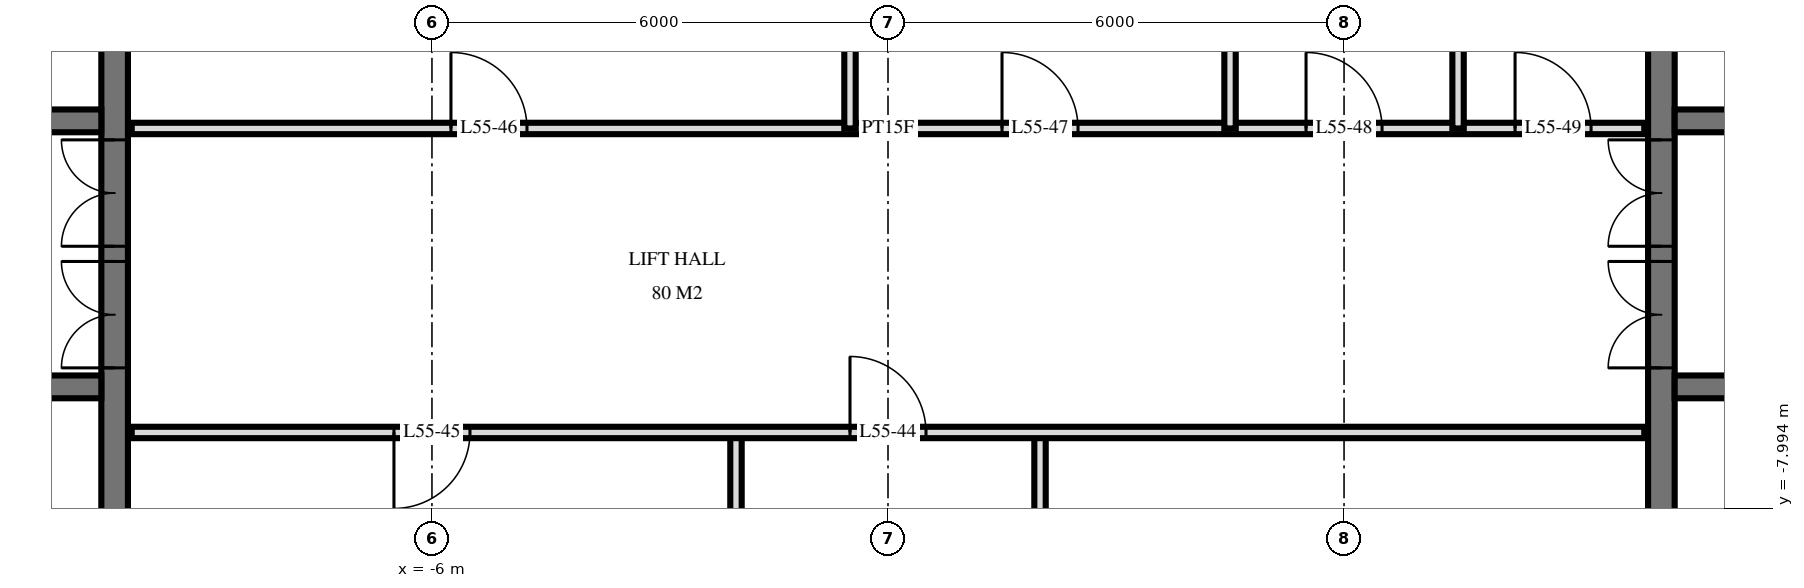
"""IFC4 building model, lengths in metres.
Left out: names, types, materials, properties, quantities, classifications, styles, units other than length and angle.
Written with IfcOpenShell. Run it as: python <this file> out.ifc"""

import sys

from ifc_helpers import new_model, si_unit, direction, frame, frame_2d, origin, place, context, subcontext, project, spatial, rectangle, extrude, element, fill, save


model = new_model("IFC4")
c1 = context("Model", 3, precision=1e-05, world=origin(), true_north=direction((0.0, 1.0)))
c2 = subcontext(c1, "Body", "Model", "MODEL_VIEW")
j1 = project(units=[si_unit("LENGTHUNIT", "METRE"), si_unit("PLANEANGLEUNIT", "RADIAN")], contexts=[c1])
p1 = place(None, origin())
s1 = spatial("IfcSite", under=j1, at=p1, CompositionType="ELEMENT")
p2 = place(p1, origin())
s2 = spatial("IfcBuilding", under=s1, at=p2, CompositionType="ELEMENT")
p3 = place(p2, frame((0.0, 0.0, 211.6)))
s3 = spatial("IfcBuildingStorey", under=s2, at=p3, CompositionType="ELEMENT", Elevation=211.6)
p4 = place(p3, frame((-10.175, -14.55, 0.0), z_axis=(0.0, 0.0, 1.0), x_axis=(0.0, 1.0, 0.0)))
e1 = element("IfcWall", 1, at=p4, inside=s3, PredefinedType="SHEAR", context=c2, shape_type="SweptSolid", body=[
    extrude(rectangle(XDim=14.1, YDim=0.35, at=frame_2d((7.05, 0.0))), origin(), (0.0, 0.0, 1.0), 3.5),
])
p5 = place(p4, frame((8.4, 0.0, 0.0)))
e2 = element("IfcOpeningElement", 2, at=p5, cuts=e1, PredefinedType="OPENING", context=c2, shape_type="SweptSolid", body=[
    extrude(rectangle(XDim=1.4, YDim=2.4, at=frame_2d((0.7, 1.2))), frame((0.0, 0.185, 0.0), z_axis=(0.0, -1.0, 0.0), x_axis=(1.0, 0.0, 0.0)), (0.0, 0.0, 1.0), 0.37),
])
p6 = place(p4, frame((10.0, 0.0, 0.0)))
e3 = element("IfcOpeningElement", 3, at=p6, cuts=e1, PredefinedType="OPENING", context=c2, shape_type="SweptSolid", body=[
    extrude(rectangle(XDim=1.4, YDim=2.4, at=frame_2d((0.7, 1.2))), frame((0.0, 0.185, 0.0), z_axis=(0.0, -1.0, 0.0), x_axis=(1.0, 0.0, 0.0)), (0.0, 0.0, 1.0), 0.37),
])
p7 = place(p4, frame((4.0, 0.0, 0.0)))
e4 = element("IfcOpeningElement", 4, at=p7, cuts=e1, PredefinedType="OPENING", context=c2, shape_type="SweptSolid", body=[
    extrude(rectangle(XDim=1.2, YDim=2.1, at=frame_2d((0.6, 1.05))), frame((0.0, 0.185, 0.0), z_axis=(0.0, -1.0, 0.0), x_axis=(1.0, 0.0, 0.0)), (0.0, 0.0, 1.0), 0.37),
])
p8 = place(p3, frame((-24.05, -2.9, 0.0), z_axis=(0.0, 0.0, 1.0), x_axis=(1.0, 0.0, 0.0)))
e5 = element("IfcWall", 5, at=p8, inside=s3, PredefinedType="SHEAR", context=c2, shape_type="SweptSolid", body=[
    extrude(rectangle(XDim=13.7, YDim=0.3, at=frame_2d((6.85, 0.0))), origin(), (0.0, 0.0, 1.0), 3.5),
])
p9 = place(p8, frame((0.55, 0.0, 0.0)))
e6 = element("IfcOpeningElement", 6, at=p9, cuts=e5, PredefinedType="OPENING", context=c2, shape_type="SweptSolid", body=[
    extrude(rectangle(XDim=1.1, YDim=2.1, at=frame_2d((0.55, 1.05))), frame((0.0, 0.16, 0.0), z_axis=(0.0, -1.0, 0.0), x_axis=(1.0, 0.0, 0.0)), (0.0, 0.0, 1.0), 0.32),
])
p10 = place(p8, frame((6.863, 0.0, 0.0)))
e7 = element("IfcOpeningElement", 7, at=p10, cuts=e5, PredefinedType="OPENING", context=c2, shape_type="SweptSolid", body=[
    extrude(rectangle(XDim=0.9, YDim=2.1, at=frame_2d((0.45, 1.05))), frame((0.0, 0.16, 0.0), z_axis=(0.0, -1.0, 0.0), x_axis=(1.0, 0.0, 0.0)), (0.0, 0.0, 1.0), 0.32),
])
p11 = place(p8, frame((5.438, 0.0, 0.0)))
e8 = element("IfcOpeningElement", 8, at=p11, cuts=e5, PredefinedType="OPENING", context=c2, shape_type="SweptSolid", body=[
    extrude(rectangle(XDim=0.9, YDim=2.1, at=frame_2d((0.45, 1.05))), frame((0.0, 0.16, 0.0), z_axis=(0.0, -1.0, 0.0), x_axis=(1.0, 0.0, 0.0)), (0.0, 0.0, 1.0), 0.32),
])
p12 = place(p8, frame((11.85, 0.0, 0.0)))
e9 = element("IfcOpeningElement", 9, at=p12, cuts=e5, PredefinedType="OPENING", context=c2, shape_type="SweptSolid", body=[
    extrude(rectangle(XDim=1.0, YDim=2.1, at=frame_2d((0.5, 1.05))), frame((0.0, 0.16, 0.0), z_axis=(0.0, -1.0, 0.0), x_axis=(1.0, 0.0, 0.0)), (0.0, 0.0, 1.0), 0.32),
])
p13 = place(p8, frame((9.562, 0.0, 0.0)))
e10 = element("IfcOpeningElement", 10, at=p13, cuts=e5, PredefinedType="OPENING", context=c2, shape_type="SweptSolid", body=[
    extrude(rectangle(XDim=1.0, YDim=2.1, at=frame_2d((0.5, 1.05))), frame((0.0, 0.16, 0.0), z_axis=(0.0, -1.0, 0.0), x_axis=(1.0, 0.0, 0.0)), (0.0, 0.0, 1.0), 0.32),
])
p14 = place(p8, frame((8.137, 0.0, 0.0)))
e11 = element("IfcOpeningElement", 11, at=p14, cuts=e5, PredefinedType="OPENING", context=c2, shape_type="SweptSolid", body=[
    extrude(rectangle(XDim=1.0, YDim=2.1, at=frame_2d((0.5, 1.05))), frame((0.0, 0.16, 0.0), z_axis=(0.0, -1.0, 0.0), x_axis=(1.0, 0.0, 0.0)), (0.0, 0.0, 1.0), 0.32),
])
p15 = place(p8, frame((3.0, 0.0, 0.0)))
e12 = element("IfcOpeningElement", 12, at=p15, cuts=e5, PredefinedType="OPENING", context=c2, shape_type="SweptSolid", body=[
    extrude(rectangle(XDim=1.0, YDim=2.1, at=frame_2d((0.5, 1.05))), frame((0.0, 0.16, 0.0), z_axis=(0.0, -1.0, 0.0), x_axis=(1.0, 0.0, 0.0)), (0.0, 0.0, 1.0), 0.32),
])
p16 = place(p3, frame((-24.05, -6.4, 0.0), z_axis=(0.0, 0.0, 1.0), x_axis=(1.0, 0.0, 0.0)))
e13 = element("IfcWall", 13, at=p16, inside=s3, PredefinedType="SHEAR", context=c2, shape_type="SweptSolid", body=[
    extrude(rectangle(XDim=13.7, YDim=0.3, at=frame_2d((6.85, 0.0))), origin(), (0.0, 0.0, 1.0), 3.5),
])
p17 = place(p16, frame((0.55, 0.0, 0.0)))
e14 = element("IfcOpeningElement", 14, at=p17, cuts=e13, PredefinedType="OPENING", context=c2, shape_type="SweptSolid", body=[
    extrude(rectangle(XDim=1.1, YDim=2.1, at=frame_2d((0.55, 1.05))), frame((0.0, 0.16, 0.0), z_axis=(0.0, -1.0, 0.0), x_axis=(1.0, 0.0, 0.0)), (0.0, 0.0, 1.0), 0.32),
])
p18 = place(p16, frame((5.8, 0.0, 0.0)))
e15 = element("IfcOpeningElement", 15, at=p18, cuts=e13, PredefinedType="OPENING", context=c2, shape_type="SweptSolid", body=[
    extrude(rectangle(XDim=1.1, YDim=2.1, at=frame_2d((0.55, 1.05))), frame((0.0, 0.16, 0.0), z_axis=(0.0, -1.0, 0.0), x_axis=(1.0, 0.0, 0.0)), (0.0, 0.0, 1.0), 0.32),
])
p19 = place(p3, frame((10.175, -14.55, 0.0), z_axis=(0.0, 0.0, 1.0), x_axis=(0.0, 1.0, 0.0)))
e16 = element("IfcWall", 16, at=p19, inside=s3, PredefinedType="SHEAR", context=c2, shape_type="SweptSolid", body=[
    extrude(rectangle(XDim=14.1, YDim=0.35, at=frame_2d((7.05, 0.0))), origin(), (0.0, 0.0, 1.0), 3.5),
])
p20 = place(p19, frame((8.4, 0.0, 0.0)))
e17 = element("IfcOpeningElement", 17, at=p20, cuts=e16, PredefinedType="OPENING", context=c2, shape_type="SweptSolid", body=[
    extrude(rectangle(XDim=1.4, YDim=2.4, at=frame_2d((0.7, 1.2))), frame((0.0, 0.185, 0.0), z_axis=(0.0, -1.0, 0.0), x_axis=(1.0, 0.0, 0.0)), (0.0, 0.0, 1.0), 0.37),
])
p21 = place(p19, frame((10.0, 0.0, 0.0)))
e18 = element("IfcOpeningElement", 18, at=p21, cuts=e16, PredefinedType="OPENING", context=c2, shape_type="SweptSolid", body=[
    extrude(rectangle(XDim=1.4, YDim=2.4, at=frame_2d((0.7, 1.2))), frame((0.0, 0.185, 0.0), z_axis=(0.0, -1.0, 0.0), x_axis=(1.0, 0.0, 0.0)), (0.0, 0.0, 1.0), 0.37),
])
p22 = place(p19, frame((4.0, 0.0, 0.0)))
e19 = element("IfcOpeningElement", 19, at=p22, cuts=e16, PredefinedType="OPENING", context=c2, shape_type="SweptSolid", body=[
    extrude(rectangle(XDim=1.2, YDim=2.1, at=frame_2d((0.6, 1.05))), frame((0.0, 0.185, 0.0), z_axis=(0.0, -1.0, 0.0), x_axis=(1.0, 0.0, 0.0)), (0.0, 0.0, 1.0), 0.37),
])
p23 = place(p3, frame((10.35, -2.9, 0.0), z_axis=(0.0, 0.0, 1.0), x_axis=(1.0, 0.0, 0.0)))
e20 = element("IfcWall", 20, at=p23, inside=s3, PredefinedType="SHEAR", context=c2, shape_type="SweptSolid", body=[
    extrude(rectangle(XDim=13.7, YDim=0.3, at=frame_2d((6.85, 0.0))), origin(), (0.0, 0.0, 1.0), 3.5),
])
p24 = place(p23, frame((12.05, 0.0, 0.0)))
e21 = element("IfcOpeningElement", 21, at=p24, cuts=e20, PredefinedType="OPENING", context=c2, shape_type="SweptSolid", body=[
    extrude(rectangle(XDim=1.1, YDim=2.1, at=frame_2d((0.55, 1.05))), frame((0.0, 0.16, 0.0), z_axis=(0.0, -1.0, 0.0), x_axis=(1.0, 0.0, 0.0)), (0.0, 0.0, 1.0), 0.32),
])
p25 = place(p23, frame((5.938, 0.0, 0.0)))
e22 = element("IfcOpeningElement", 22, at=p25, cuts=e20, PredefinedType="OPENING", context=c2, shape_type="SweptSolid", body=[
    extrude(rectangle(XDim=0.9, YDim=2.1, at=frame_2d((0.45, 1.05))), frame((0.0, 0.16, 0.0), z_axis=(0.0, -1.0, 0.0), x_axis=(1.0, 0.0, 0.0)), (0.0, 0.0, 1.0), 0.32),
])
p26 = place(p23, frame((7.363, 0.0, 0.0)))
e23 = element("IfcOpeningElement", 23, at=p26, cuts=e20, PredefinedType="OPENING", context=c2, shape_type="SweptSolid", body=[
    extrude(rectangle(XDim=0.9, YDim=2.1, at=frame_2d((0.45, 1.05))), frame((0.0, 0.16, 0.0), z_axis=(0.0, -1.0, 0.0), x_axis=(1.0, 0.0, 0.0)), (0.0, 0.0, 1.0), 0.32),
])
p27 = place(p23, frame((0.85, 0.0, 0.0)))
e24 = element("IfcOpeningElement", 24, at=p27, cuts=e20, PredefinedType="OPENING", context=c2, shape_type="SweptSolid", body=[
    extrude(rectangle(XDim=1.0, YDim=2.1, at=frame_2d((0.5, 1.05))), frame((0.0, 0.16, 0.0), z_axis=(0.0, -1.0, 0.0), x_axis=(1.0, 0.0, 0.0)), (0.0, 0.0, 1.0), 0.32),
])
p28 = place(p23, frame((3.137, 0.0, 0.0)))
e25 = element("IfcOpeningElement", 25, at=p28, cuts=e20, PredefinedType="OPENING", context=c2, shape_type="SweptSolid", body=[
    extrude(rectangle(XDim=1.0, YDim=2.1, at=frame_2d((0.5, 1.05))), frame((0.0, 0.16, 0.0), z_axis=(0.0, -1.0, 0.0), x_axis=(1.0, 0.0, 0.0)), (0.0, 0.0, 1.0), 0.32),
])
p29 = place(p23, frame((4.562, 0.0, 0.0)))
e26 = element("IfcOpeningElement", 26, at=p29, cuts=e20, PredefinedType="OPENING", context=c2, shape_type="SweptSolid", body=[
    extrude(rectangle(XDim=1.0, YDim=2.1, at=frame_2d((0.5, 1.05))), frame((0.0, 0.16, 0.0), z_axis=(0.0, -1.0, 0.0), x_axis=(1.0, 0.0, 0.0)), (0.0, 0.0, 1.0), 0.32),
])
p30 = place(p23, frame((9.7, 0.0, 0.0)))
e27 = element("IfcOpeningElement", 27, at=p30, cuts=e20, PredefinedType="OPENING", context=c2, shape_type="SweptSolid", body=[
    extrude(rectangle(XDim=1.0, YDim=2.1, at=frame_2d((0.5, 1.05))), frame((0.0, 0.16, 0.0), z_axis=(0.0, -1.0, 0.0), x_axis=(1.0, 0.0, 0.0)), (0.0, 0.0, 1.0), 0.32),
])
p31 = place(p3, frame((10.35, -6.4, 0.0), z_axis=(0.0, 0.0, 1.0), x_axis=(1.0, 0.0, 0.0)))
e28 = element("IfcWall", 28, at=p31, inside=s3, PredefinedType="SHEAR", context=c2, shape_type="SweptSolid", body=[
    extrude(rectangle(XDim=13.7, YDim=0.3, at=frame_2d((6.85, 0.0))), origin(), (0.0, 0.0, 1.0), 3.5),
])
p32 = place(p31, frame((12.05, 0.0, 0.0)))
e29 = element("IfcOpeningElement", 29, at=p32, cuts=e28, PredefinedType="OPENING", context=c2, shape_type="SweptSolid", body=[
    extrude(rectangle(XDim=1.1, YDim=2.1, at=frame_2d((0.55, 1.05))), frame((0.0, 0.16, 0.0), z_axis=(0.0, -1.0, 0.0), x_axis=(1.0, 0.0, 0.0)), (0.0, 0.0, 1.0), 0.32),
])
p33 = place(p31, frame((6.8, 0.0, 0.0)))
e30 = element("IfcOpeningElement", 30, at=p33, cuts=e28, PredefinedType="OPENING", context=c2, shape_type="SweptSolid", body=[
    extrude(rectangle(XDim=1.1, YDim=2.1, at=frame_2d((0.55, 1.05))), frame((0.0, 0.16, 0.0), z_axis=(0.0, -1.0, 0.0), x_axis=(1.0, 0.0, 0.0)), (0.0, 0.0, 1.0), 0.32),
])
for number, where, z_axis, x_axis in (
    (31, (7.5, -3.0, 0.0), (0.0, 0.0, 1.0), (0.0, 1.0, 0.0)),
    (32, (4.5, -3.0, 0.0), (0.0, 0.0, 1.0), (0.0, 1.0, 0.0)),
):
    element("IfcWall", number, at=place(p3, frame(where, z_axis=z_axis, x_axis=x_axis)), inside=s3, PredefinedType="PLUMBINGWALL", context=c2, shape_type="SweptSolid", body=[
        extrude(rectangle(XDim=4.02, YDim=0.15, at=frame_2d((2.01, 0.0))), origin(), (0.0, 0.0, 1.0), 3.22),
    ])
p34 = place(p3, frame((2.0, -11.0, 0.0), z_axis=(0.0, 0.0, 1.0), x_axis=(0.0, 1.0, 0.0)))
e33 = element("IfcWall", 33, at=p34, inside=s3, PredefinedType="PARTITIONING", context=c2, shape_type="SweptSolid", body=[
    extrude(rectangle(XDim=4.0, YDim=0.15, at=frame_2d((2.0, 0.0))), origin(), (0.0, 0.0, 1.0), 3.22),
])
p35 = place(p3, frame((-0.5, -3.0, 0.0), z_axis=(0.0, 0.0, 1.0), x_axis=(0.0, 1.0, 0.0)))
e34 = element("IfcWall", 34, at=p35, inside=s3, PredefinedType="PARTITIONING", context=c2, shape_type="SweptSolid", body=[
    extrude(rectangle(XDim=4.02, YDim=0.15, at=frame_2d((2.01, 0.0))), origin(), (0.0, 0.0, 1.0), 3.22),
])
p36 = place(p3, frame((-2.0, -11.0, 0.0), z_axis=(0.0, 0.0, 1.0), x_axis=(0.0, 1.0, 0.0)))
e35 = element("IfcWall", 35, at=p36, inside=s3, PredefinedType="PARTITIONING", context=c2, shape_type="SweptSolid", body=[
    extrude(rectangle(XDim=4.0, YDim=0.15, at=frame_2d((2.0, 0.0))), origin(), (0.0, 0.0, 1.0), 3.22),
])
p37 = place(p3, frame((-9.95, -7.0, 0.0), z_axis=(0.0, 0.0, 1.0), x_axis=(1.0, 0.0, 0.0)))
e36 = element("IfcWall", 36, at=p37, inside=s3, PredefinedType="PARTITIONING", context=c2, shape_type="SweptSolid", body=[
    extrude(rectangle(XDim=19.9, YDim=0.15, at=frame_2d((9.95, 0.0))), origin(), (0.0, 0.0, 1.0), 3.22),
])
p38 = place(p37, frame((9.45, 0.0, 0.0)))
e37 = element("IfcOpeningElement", 37, at=p38, cuts=e36, PredefinedType="OPENING", context=c2, shape_type="SweptSolid", body=[
    extrude(rectangle(XDim=1.0, YDim=2.1, at=frame_2d((0.5, 1.05))), frame((0.0, 0.085, 0.0), z_axis=(0.0, -1.0, 0.0), x_axis=(1.0, 0.0, 0.0)), (0.0, 0.0, 1.0), 0.17),
])
p39 = place(p37, frame((3.45, 0.0, 0.0)))
e38 = element("IfcOpeningElement", 38, at=p39, cuts=e36, PredefinedType="OPENING", context=c2, shape_type="SweptSolid", body=[
    extrude(rectangle(XDim=1.0, YDim=2.1, at=frame_2d((0.5, 1.05))), frame((0.0, 0.085, 0.0), z_axis=(0.0, -1.0, 0.0), x_axis=(1.0, 0.0, 0.0)), (0.0, 0.0, 1.0), 0.17),
])
p40 = place(p3, frame((-9.95, -3.0, 0.0), z_axis=(0.0, 0.0, 1.0), x_axis=(1.0, 0.0, 0.0)))
e39 = element("IfcWall", 39, at=p40, inside=s3, PredefinedType="PARTITIONING", context=c2, shape_type="SweptSolid", body=[
    extrude(rectangle(XDim=19.9, YDim=0.15, at=frame_2d((9.95, 0.0))), origin(), (0.0, 0.0, 1.0), 3.22),
])
p41 = place(p40, frame((4.2, 0.0, 0.0)))
e40 = element("IfcOpeningElement", 40, at=p41, cuts=e39, PredefinedType="OPENING", context=c2, shape_type="SweptSolid", body=[
    extrude(rectangle(XDim=1.0, YDim=2.1, at=frame_2d((0.5, 1.05))), frame((0.0, 0.085, 0.0), z_axis=(0.0, -1.0, 0.0), x_axis=(1.0, 0.0, 0.0)), (0.0, 0.0, 1.0), 0.17),
])
p42 = place(p40, frame((11.45, 0.0, 0.0)))
e41 = element("IfcOpeningElement", 41, at=p42, cuts=e39, PredefinedType="OPENING", context=c2, shape_type="SweptSolid", body=[
    extrude(rectangle(XDim=1.0, YDim=2.1, at=frame_2d((0.5, 1.05))), frame((0.0, 0.085, 0.0), z_axis=(0.0, -1.0, 0.0), x_axis=(1.0, 0.0, 0.0)), (0.0, 0.0, 1.0), 0.17),
])
p43 = place(p40, frame((15.45, 0.0, 0.0)))
e42 = element("IfcOpeningElement", 42, at=p43, cuts=e39, PredefinedType="OPENING", context=c2, shape_type="SweptSolid", body=[
    extrude(rectangle(XDim=1.0, YDim=2.1, at=frame_2d((0.5, 1.05))), frame((0.0, 0.085, 0.0), z_axis=(0.0, -1.0, 0.0), x_axis=(1.0, 0.0, 0.0)), (0.0, 0.0, 1.0), 0.17),
])
p44 = place(p40, frame((18.2, 0.0, 0.0)))
e43 = element("IfcOpeningElement", 43, at=p44, cuts=e39, PredefinedType="OPENING", context=c2, shape_type="SweptSolid", body=[
    extrude(rectangle(XDim=1.0, YDim=2.1, at=frame_2d((0.5, 1.05))), frame((0.0, 0.085, 0.0), z_axis=(0.0, -1.0, 0.0), x_axis=(1.0, 0.0, 0.0)), (0.0, 0.0, 1.0), 0.17),
])
p45 = place(p5, origin())
e44 = element("IfcDoor", 44, at=p45, inside=s3, OperationType="DOUBLE_DOOR_SINGLE_SWING", PredefinedType="DOOR", context=c2, shape_type="SweptSolid", body=[
    extrude(rectangle(XDim=1.4, YDim=2.4, at=frame_2d((0.7, 1.2))), frame((0.0, 0.025, 0.0), z_axis=(0.0, -1.0, 0.0), x_axis=(1.0, 0.0, 0.0)), (0.0, 0.0, 1.0), 0.05),
])
fill(e2, e44)
p46 = place(p6, origin())
e45 = element("IfcDoor", 45, at=p46, inside=s3, OperationType="DOUBLE_DOOR_SINGLE_SWING", PredefinedType="DOOR", context=c2, shape_type="SweptSolid", body=[
    extrude(rectangle(XDim=1.4, YDim=2.4, at=frame_2d((0.7, 1.2))), frame((0.0, 0.025, 0.0), z_axis=(0.0, -1.0, 0.0), x_axis=(1.0, 0.0, 0.0)), (0.0, 0.0, 1.0), 0.05),
])
fill(e3, e45)
p47 = place(p20, origin())
e46 = element("IfcDoor", 46, at=p47, inside=s3, OperationType="DOUBLE_DOOR_SINGLE_SWING", PredefinedType="DOOR", context=c2, shape_type="SweptSolid", body=[
    extrude(rectangle(XDim=1.4, YDim=2.4, at=frame_2d((0.7, 1.2))), frame((0.0, 0.025, 0.0), z_axis=(0.0, -1.0, 0.0), x_axis=(1.0, 0.0, 0.0)), (0.0, 0.0, 1.0), 0.05),
])
fill(e17, e46)
p48 = place(p21, origin())
e47 = element("IfcDoor", 47, at=p48, inside=s3, OperationType="DOUBLE_DOOR_SINGLE_SWING", PredefinedType="DOOR", context=c2, shape_type="SweptSolid", body=[
    extrude(rectangle(XDim=1.4, YDim=2.4, at=frame_2d((0.7, 1.2))), frame((0.0, 0.025, 0.0), z_axis=(0.0, -1.0, 0.0), x_axis=(1.0, 0.0, 0.0)), (0.0, 0.0, 1.0), 0.05),
])
fill(e18, e47)
p49 = place(p38, origin())
e48 = element("IfcDoor", 48, at=p49, inside=s3, OperationType="SINGLE_SWING_RIGHT", PredefinedType="DOOR", context=c2, shape_type="SweptSolid", body=[
    extrude(rectangle(XDim=1.0, YDim=2.1, at=frame_2d((0.5, 1.05))), frame((0.0, 0.025, 0.0), z_axis=(0.0, -1.0, 0.0), x_axis=(1.0, 0.0, 0.0)), (0.0, 0.0, 1.0), 0.05),
])
fill(e37, e48)
p50 = place(p39, frame((0.5, 0.0, 0.0), z_axis=(0.0, 0.0, 1.0), x_axis=(-1.0, 0.0, 0.0)))
e49 = element("IfcDoor", 49, at=p50, inside=s3, OperationType="SINGLE_SWING_LEFT", PredefinedType="DOOR", context=c2, shape_type="SweptSolid", body=[
    extrude(rectangle(XDim=1.0, YDim=2.1, at=frame_2d((0.0, 1.05))), frame((0.0, -0.025, 0.0), z_axis=(0.0, 1.0, 0.0), x_axis=(-1.0, 0.0, 0.0)), (0.0, 0.0, 1.0), 0.05),
])
fill(e38, e49)
p51 = place(p41, origin())
e50 = element("IfcDoor", 50, at=p51, inside=s3, OperationType="SINGLE_SWING_RIGHT", PredefinedType="DOOR", context=c2, shape_type="SweptSolid", body=[
    extrude(rectangle(XDim=1.0, YDim=2.1, at=frame_2d((0.5, 1.05))), frame((0.0, 0.025, 0.0), z_axis=(0.0, -1.0, 0.0), x_axis=(1.0, 0.0, 0.0)), (0.0, 0.0, 1.0), 0.05),
])
fill(e40, e50)
p52 = place(p42, origin())
e51 = element("IfcDoor", 51, at=p52, inside=s3, OperationType="SINGLE_SWING_RIGHT", PredefinedType="DOOR", context=c2, shape_type="SweptSolid", body=[
    extrude(rectangle(XDim=1.0, YDim=2.1, at=frame_2d((0.5, 1.05))), frame((0.0, 0.025, 0.0), z_axis=(0.0, -1.0, 0.0), x_axis=(1.0, 0.0, 0.0)), (0.0, 0.0, 1.0), 0.05),
])
fill(e41, e51)
p53 = place(p43, origin())
e52 = element("IfcDoor", 52, at=p53, inside=s3, OperationType="SINGLE_SWING_RIGHT", PredefinedType="DOOR", context=c2, shape_type="SweptSolid", body=[
    extrude(rectangle(XDim=1.0, YDim=2.1, at=frame_2d((0.5, 1.05))), frame((0.0, 0.025, 0.0), z_axis=(0.0, -1.0, 0.0), x_axis=(1.0, 0.0, 0.0)), (0.0, 0.0, 1.0), 0.05),
])
fill(e42, e52)
p54 = place(p44, origin())
e53 = element("IfcDoor", 53, at=p54, inside=s3, OperationType="SINGLE_SWING_RIGHT", PredefinedType="DOOR", context=c2, shape_type="SweptSolid", body=[
    extrude(rectangle(XDim=1.0, YDim=2.1, at=frame_2d((0.5, 1.05))), frame((0.0, 0.025, 0.0), z_axis=(0.0, -1.0, 0.0), x_axis=(1.0, 0.0, 0.0)), (0.0, 0.0, 1.0), 0.05),
])
fill(e43, e53)
save(model, sys.argv[1])
